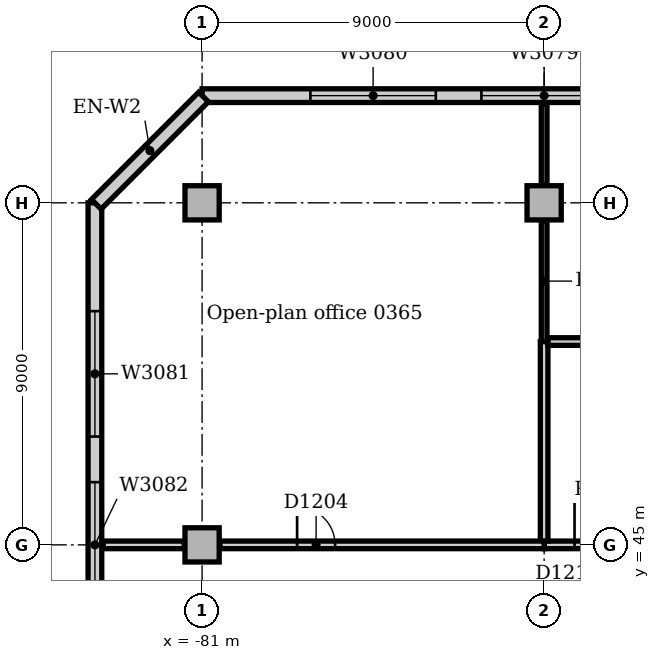
"""IFC4 building model, lengths in metres.
Left out: names, types, materials, properties, quantities, classifications, styles, units other than length and angle.
Written with IfcOpenShell. Run it as: python <this file> out.ifc"""

import sys

from ifc_helpers import new_model, si_unit, direction, frame, frame_2d, origin, origin_2d, place, context, subcontext, project, spatial, rectangle, extrude, element, fill, save


model = new_model("IFC4")
c1 = context("Model", 3, precision=1e-05, world=origin(), true_north=direction((0.0, 1.0)))
c2 = subcontext(c1, "Body", "Model", "MODEL_VIEW")
j1 = project(units=[si_unit("LENGTHUNIT", "METRE"), si_unit("PLANEANGLEUNIT", "RADIAN")], contexts=[c1])
p1 = place(None, origin())
s1 = spatial("IfcSite", under=j1, at=p1, CompositionType="ELEMENT")
p2 = place(p1, origin())
s2 = spatial("IfcBuilding", under=s1, at=p2, CompositionType="ELEMENT")
p3 = place(p2, frame((0.0, 0.0, 16.0)))
s3 = spatial("IfcBuildingStorey", under=s2, at=p3, CompositionType="ELEMENT", Elevation=16.0)
for number, where, z_axis, x_axis in (
    (1, (-81.0, 45.0, 0.0), (0.0, 0.0, 1.0), (1.0, 0.0, 0.0)),
    (2, (-81.0, 54.0, 0.0), (0.0, 0.0, 1.0), (1.0, 0.0, 0.0)),
    (3, (-72.0, 54.0, 0.0), (0.0, 0.0, 1.0), (1.0, 0.0, 0.0)),
):
    element("IfcColumn", number, at=place(p3, frame(where, z_axis=z_axis, x_axis=x_axis)), inside=s3, PredefinedType="COLUMN", context=c2, shape_type="SweptSolid", body=[
        extrude(rectangle(XDim=0.9, YDim=0.9, at=origin_2d()), origin(), (0.0, 0.0, 1.0), 4.7),
    ])
p4 = place(p3, frame((63.0, 56.82, 0.0), z_axis=(0.0, 0.0, 1.0), x_axis=(-1.0, 0.0, 0.0)))
e4 = element("IfcWall", 4, at=p4, inside=s3, PredefinedType="STANDARD", context=c2, shape_type="SweptSolid", body=[
    extrude(rectangle(XDim=144.0, YDim=0.36, at=frame_2d((72.0, 0.0))), origin(), (0.0, 0.0, 1.0), 4.7),
])
p5 = place(p4, frame((2.85, 0.0, 0.9)))
e5 = element("IfcOpeningElement", 5, at=p5, cuts=e4, PredefinedType="OPENING", context=c2, shape_type="SweptSolid", body=[
    extrude(rectangle(XDim=3.3, YDim=2.4, at=frame_2d((1.65, 1.2))), frame((0.0, 0.19, 0.0), z_axis=(0.0, -1.0, 0.0), x_axis=(1.0, 0.0, 0.0)), (0.0, 0.0, 1.0), 0.38),
])
p6 = place(p4, frame((7.35, 0.0, 0.9)))
e6 = element("IfcOpeningElement", 6, at=p6, cuts=e4, PredefinedType="OPENING", context=c2, shape_type="SweptSolid", body=[
    extrude(rectangle(XDim=3.3, YDim=2.4, at=frame_2d((1.65, 1.2))), frame((0.0, 0.19, 0.0), z_axis=(0.0, -1.0, 0.0), x_axis=(1.0, 0.0, 0.0)), (0.0, 0.0, 1.0), 0.38),
])
p7 = place(p4, frame((11.85, 0.0, 0.9)))
e7 = element("IfcOpeningElement", 7, at=p7, cuts=e4, PredefinedType="OPENING", context=c2, shape_type="SweptSolid", body=[
    extrude(rectangle(XDim=3.3, YDim=2.4, at=frame_2d((1.65, 1.2))), frame((0.0, 0.19, 0.0), z_axis=(0.0, -1.0, 0.0), x_axis=(1.0, 0.0, 0.0)), (0.0, 0.0, 1.0), 0.38),
])
p8 = place(p4, frame((16.35, 0.0, 0.9)))
e8 = element("IfcOpeningElement", 8, at=p8, cuts=e4, PredefinedType="OPENING", context=c2, shape_type="SweptSolid", body=[
    extrude(rectangle(XDim=3.3, YDim=2.4, at=frame_2d((1.65, 1.2))), frame((0.0, 0.19, 0.0), z_axis=(0.0, -1.0, 0.0), x_axis=(1.0, 0.0, 0.0)), (0.0, 0.0, 1.0), 0.38),
])
p9 = place(p4, frame((20.85, 0.0, 0.9)))
e9 = element("IfcOpeningElement", 9, at=p9, cuts=e4, PredefinedType="OPENING", context=c2, shape_type="SweptSolid", body=[
    extrude(rectangle(XDim=3.3, YDim=2.4, at=frame_2d((1.65, 1.2))), frame((0.0, 0.19, 0.0), z_axis=(0.0, -1.0, 0.0), x_axis=(1.0, 0.0, 0.0)), (0.0, 0.0, 1.0), 0.38),
])
p10 = place(p4, frame((25.35, 0.0, 0.9)))
e10 = element("IfcOpeningElement", 10, at=p10, cuts=e4, PredefinedType="OPENING", context=c2, shape_type="SweptSolid", body=[
    extrude(rectangle(XDim=3.3, YDim=2.4, at=frame_2d((1.65, 1.2))), frame((0.0, 0.19, 0.0), z_axis=(0.0, -1.0, 0.0), x_axis=(1.0, 0.0, 0.0)), (0.0, 0.0, 1.0), 0.38),
])
p11 = place(p4, frame((29.85, 0.0, 0.9)))
e11 = element("IfcOpeningElement", 11, at=p11, cuts=e4, PredefinedType="OPENING", context=c2, shape_type="SweptSolid", body=[
    extrude(rectangle(XDim=3.3, YDim=2.4, at=frame_2d((1.65, 1.2))), frame((0.0, 0.19, 0.0), z_axis=(0.0, -1.0, 0.0), x_axis=(1.0, 0.0, 0.0)), (0.0, 0.0, 1.0), 0.38),
])
p12 = place(p4, frame((34.35, 0.0, 0.9)))
e12 = element("IfcOpeningElement", 12, at=p12, cuts=e4, PredefinedType="OPENING", context=c2, shape_type="SweptSolid", body=[
    extrude(rectangle(XDim=3.3, YDim=2.4, at=frame_2d((1.65, 1.2))), frame((0.0, 0.19, 0.0), z_axis=(0.0, -1.0, 0.0), x_axis=(1.0, 0.0, 0.0)), (0.0, 0.0, 1.0), 0.38),
])
p13 = place(p4, frame((38.85, 0.0, 0.9)))
e13 = element("IfcOpeningElement", 13, at=p13, cuts=e4, PredefinedType="OPENING", context=c2, shape_type="SweptSolid", body=[
    extrude(rectangle(XDim=3.3, YDim=2.4, at=frame_2d((1.65, 1.2))), frame((0.0, 0.19, 0.0), z_axis=(0.0, -1.0, 0.0), x_axis=(1.0, 0.0, 0.0)), (0.0, 0.0, 1.0), 0.38),
])
p14 = place(p4, frame((43.35, 0.0, 0.9)))
e14 = element("IfcOpeningElement", 14, at=p14, cuts=e4, PredefinedType="OPENING", context=c2, shape_type="SweptSolid", body=[
    extrude(rectangle(XDim=3.3, YDim=2.4, at=frame_2d((1.65, 1.2))), frame((0.0, 0.19, 0.0), z_axis=(0.0, -1.0, 0.0), x_axis=(1.0, 0.0, 0.0)), (0.0, 0.0, 1.0), 0.38),
])
p15 = place(p4, frame((47.85, 0.0, 0.9)))
e15 = element("IfcOpeningElement", 15, at=p15, cuts=e4, PredefinedType="OPENING", context=c2, shape_type="SweptSolid", body=[
    extrude(rectangle(XDim=3.3, YDim=2.4, at=frame_2d((1.65, 1.2))), frame((0.0, 0.19, 0.0), z_axis=(0.0, -1.0, 0.0), x_axis=(1.0, 0.0, 0.0)), (0.0, 0.0, 1.0), 0.38),
])
p16 = place(p4, frame((52.35, 0.0, 0.9)))
e16 = element("IfcOpeningElement", 16, at=p16, cuts=e4, PredefinedType="OPENING", context=c2, shape_type="SweptSolid", body=[
    extrude(rectangle(XDim=3.3, YDim=2.4, at=frame_2d((1.65, 1.2))), frame((0.0, 0.19, 0.0), z_axis=(0.0, -1.0, 0.0), x_axis=(1.0, 0.0, 0.0)), (0.0, 0.0, 1.0), 0.38),
])
p17 = place(p4, frame((56.85, 0.0, 0.9)))
e17 = element("IfcOpeningElement", 17, at=p17, cuts=e4, PredefinedType="OPENING", context=c2, shape_type="SweptSolid", body=[
    extrude(rectangle(XDim=3.3, YDim=2.4, at=frame_2d((1.65, 1.2))), frame((0.0, 0.19, 0.0), z_axis=(0.0, -1.0, 0.0), x_axis=(1.0, 0.0, 0.0)), (0.0, 0.0, 1.0), 0.38),
])
p18 = place(p4, frame((92.85, 0.0, 0.9)))
e18 = element("IfcOpeningElement", 18, at=p18, cuts=e4, PredefinedType="OPENING", context=c2, shape_type="SweptSolid", body=[
    extrude(rectangle(XDim=3.3, YDim=2.4, at=frame_2d((1.65, 1.2))), frame((0.0, 0.19, 0.0), z_axis=(0.0, -1.0, 0.0), x_axis=(1.0, 0.0, 0.0)), (0.0, 0.0, 1.0), 0.38),
])
p19 = place(p4, frame((97.35, 0.0, 0.9)))
e19 = element("IfcOpeningElement", 19, at=p19, cuts=e4, PredefinedType="OPENING", context=c2, shape_type="SweptSolid", body=[
    extrude(rectangle(XDim=3.3, YDim=2.4, at=frame_2d((1.65, 1.2))), frame((0.0, 0.19, 0.0), z_axis=(0.0, -1.0, 0.0), x_axis=(1.0, 0.0, 0.0)), (0.0, 0.0, 1.0), 0.38),
])
p20 = place(p4, frame((101.85, 0.0, 0.9)))
e20 = element("IfcOpeningElement", 20, at=p20, cuts=e4, PredefinedType="OPENING", context=c2, shape_type="SweptSolid", body=[
    extrude(rectangle(XDim=3.3, YDim=2.4, at=frame_2d((1.65, 1.2))), frame((0.0, 0.19, 0.0), z_axis=(0.0, -1.0, 0.0), x_axis=(1.0, 0.0, 0.0)), (0.0, 0.0, 1.0), 0.38),
])
p21 = place(p4, frame((106.35, 0.0, 0.9)))
e21 = element("IfcOpeningElement", 21, at=p21, cuts=e4, PredefinedType="OPENING", context=c2, shape_type="SweptSolid", body=[
    extrude(rectangle(XDim=3.3, YDim=2.4, at=frame_2d((1.65, 1.2))), frame((0.0, 0.19, 0.0), z_axis=(0.0, -1.0, 0.0), x_axis=(1.0, 0.0, 0.0)), (0.0, 0.0, 1.0), 0.38),
])
p22 = place(p4, frame((110.85, 0.0, 0.9)))
e22 = element("IfcOpeningElement", 22, at=p22, cuts=e4, PredefinedType="OPENING", context=c2, shape_type="SweptSolid", body=[
    extrude(rectangle(XDim=3.3, YDim=2.4, at=frame_2d((1.65, 1.2))), frame((0.0, 0.19, 0.0), z_axis=(0.0, -1.0, 0.0), x_axis=(1.0, 0.0, 0.0)), (0.0, 0.0, 1.0), 0.38),
])
p23 = place(p4, frame((115.35, 0.0, 0.9)))
e23 = element("IfcOpeningElement", 23, at=p23, cuts=e4, PredefinedType="OPENING", context=c2, shape_type="SweptSolid", body=[
    extrude(rectangle(XDim=3.3, YDim=2.4, at=frame_2d((1.65, 1.2))), frame((0.0, 0.19, 0.0), z_axis=(0.0, -1.0, 0.0), x_axis=(1.0, 0.0, 0.0)), (0.0, 0.0, 1.0), 0.38),
])
p24 = place(p4, frame((119.85, 0.0, 0.9)))
e24 = element("IfcOpeningElement", 24, at=p24, cuts=e4, PredefinedType="OPENING", context=c2, shape_type="SweptSolid", body=[
    extrude(rectangle(XDim=3.3, YDim=2.4, at=frame_2d((1.65, 1.2))), frame((0.0, 0.19, 0.0), z_axis=(0.0, -1.0, 0.0), x_axis=(1.0, 0.0, 0.0)), (0.0, 0.0, 1.0), 0.38),
])
p25 = place(p4, frame((124.35, 0.0, 0.9)))
e25 = element("IfcOpeningElement", 25, at=p25, cuts=e4, PredefinedType="OPENING", context=c2, shape_type="SweptSolid", body=[
    extrude(rectangle(XDim=3.3, YDim=2.4, at=frame_2d((1.65, 1.2))), frame((0.0, 0.19, 0.0), z_axis=(0.0, -1.0, 0.0), x_axis=(1.0, 0.0, 0.0)), (0.0, 0.0, 1.0), 0.38),
])
p26 = place(p4, frame((128.85, 0.0, 0.9)))
e26 = element("IfcOpeningElement", 26, at=p26, cuts=e4, PredefinedType="OPENING", context=c2, shape_type="SweptSolid", body=[
    extrude(rectangle(XDim=3.3, YDim=2.4, at=frame_2d((1.65, 1.2))), frame((0.0, 0.19, 0.0), z_axis=(0.0, -1.0, 0.0), x_axis=(1.0, 0.0, 0.0)), (0.0, 0.0, 1.0), 0.38),
])
p27 = place(p4, frame((133.35, 0.0, 0.9)))
e27 = element("IfcOpeningElement", 27, at=p27, cuts=e4, PredefinedType="OPENING", context=c2, shape_type="SweptSolid", body=[
    extrude(rectangle(XDim=3.3, YDim=2.4, at=frame_2d((1.65, 1.2))), frame((0.0, 0.19, 0.0), z_axis=(0.0, -1.0, 0.0), x_axis=(1.0, 0.0, 0.0)), (0.0, 0.0, 1.0), 0.38),
])
p28 = place(p4, frame((137.85, 0.0, 0.9)))
e28 = element("IfcOpeningElement", 28, at=p28, cuts=e4, PredefinedType="OPENING", context=c2, shape_type="SweptSolid", body=[
    extrude(rectangle(XDim=3.3, YDim=2.4, at=frame_2d((1.65, 1.2))), frame((0.0, 0.19, 0.0), z_axis=(0.0, -1.0, 0.0), x_axis=(1.0, 0.0, 0.0)), (0.0, 0.0, 1.0), 0.38),
])
p29 = place(p3, frame((-83.82, 54.0, 0.0), z_axis=(0.0, 0.0, 1.0), x_axis=(0.0, -1.0, 0.0)))
e29 = element("IfcWall", 29, at=p29, inside=s3, PredefinedType="STANDARD", context=c2, shape_type="SweptSolid", body=[
    extrude(rectangle(XDim=63.0, YDim=0.36, at=frame_2d((31.5, 0.0))), origin(), (0.0, 0.0, 1.0), 4.7),
])
p30 = place(p29, frame((2.85, 0.0, 0.9)))
e30 = element("IfcOpeningElement", 30, at=p30, cuts=e29, PredefinedType="OPENING", context=c2, shape_type="SweptSolid", body=[
    extrude(rectangle(XDim=3.3, YDim=2.4, at=frame_2d((1.65, 1.2))), frame((0.0, 0.19, 0.0), z_axis=(0.0, -1.0, 0.0), x_axis=(1.0, 0.0, 0.0)), (0.0, 0.0, 1.0), 0.38),
])
p31 = place(p29, frame((7.35, 0.0, 0.9)))
e31 = element("IfcOpeningElement", 31, at=p31, cuts=e29, PredefinedType="OPENING", context=c2, shape_type="SweptSolid", body=[
    extrude(rectangle(XDim=3.3, YDim=2.4, at=frame_2d((1.65, 1.2))), frame((0.0, 0.19, 0.0), z_axis=(0.0, -1.0, 0.0), x_axis=(1.0, 0.0, 0.0)), (0.0, 0.0, 1.0), 0.38),
])
p32 = place(p29, frame((11.85, 0.0, 0.9)))
e32 = element("IfcOpeningElement", 32, at=p32, cuts=e29, PredefinedType="OPENING", context=c2, shape_type="SweptSolid", body=[
    extrude(rectangle(XDim=3.3, YDim=2.4, at=frame_2d((1.65, 1.2))), frame((0.0, 0.19, 0.0), z_axis=(0.0, -1.0, 0.0), x_axis=(1.0, 0.0, 0.0)), (0.0, 0.0, 1.0), 0.38),
])
p33 = place(p29, frame((16.35, 0.0, 0.9)))
e33 = element("IfcOpeningElement", 33, at=p33, cuts=e29, PredefinedType="OPENING", context=c2, shape_type="SweptSolid", body=[
    extrude(rectangle(XDim=3.3, YDim=2.4, at=frame_2d((1.65, 1.2))), frame((0.0, 0.19, 0.0), z_axis=(0.0, -1.0, 0.0), x_axis=(1.0, 0.0, 0.0)), (0.0, 0.0, 1.0), 0.38),
])
p34 = place(p29, frame((20.85, 0.0, 0.9)))
e34 = element("IfcOpeningElement", 34, at=p34, cuts=e29, PredefinedType="OPENING", context=c2, shape_type="SweptSolid", body=[
    extrude(rectangle(XDim=3.3, YDim=2.4, at=frame_2d((1.65, 1.2))), frame((0.0, 0.19, 0.0), z_axis=(0.0, -1.0, 0.0), x_axis=(1.0, 0.0, 0.0)), (0.0, 0.0, 1.0), 0.38),
])
p35 = place(p29, frame((25.35, 0.0, 0.9)))
e35 = element("IfcOpeningElement", 35, at=p35, cuts=e29, PredefinedType="OPENING", context=c2, shape_type="SweptSolid", body=[
    extrude(rectangle(XDim=3.3, YDim=2.4, at=frame_2d((1.65, 1.2))), frame((0.0, 0.19, 0.0), z_axis=(0.0, -1.0, 0.0), x_axis=(1.0, 0.0, 0.0)), (0.0, 0.0, 1.0), 0.38),
])
p36 = place(p29, frame((29.85, 0.0, 0.9)))
e36 = element("IfcOpeningElement", 36, at=p36, cuts=e29, PredefinedType="OPENING", context=c2, shape_type="SweptSolid", body=[
    extrude(rectangle(XDim=3.3, YDim=2.4, at=frame_2d((1.65, 1.2))), frame((0.0, 0.19, 0.0), z_axis=(0.0, -1.0, 0.0), x_axis=(1.0, 0.0, 0.0)), (0.0, 0.0, 1.0), 0.38),
])
p37 = place(p29, frame((34.35, 0.0, 0.9)))
e37 = element("IfcOpeningElement", 37, at=p37, cuts=e29, PredefinedType="OPENING", context=c2, shape_type="SweptSolid", body=[
    extrude(rectangle(XDim=3.3, YDim=2.4, at=frame_2d((1.65, 1.2))), frame((0.0, 0.19, 0.0), z_axis=(0.0, -1.0, 0.0), x_axis=(1.0, 0.0, 0.0)), (0.0, 0.0, 1.0), 0.38),
])
p38 = place(p29, frame((38.85, 0.0, 0.9)))
e38 = element("IfcOpeningElement", 38, at=p38, cuts=e29, PredefinedType="OPENING", context=c2, shape_type="SweptSolid", body=[
    extrude(rectangle(XDim=3.3, YDim=2.4, at=frame_2d((1.65, 1.2))), frame((0.0, 0.19, 0.0), z_axis=(0.0, -1.0, 0.0), x_axis=(1.0, 0.0, 0.0)), (0.0, 0.0, 1.0), 0.38),
])
p39 = place(p29, frame((43.35, 0.0, 0.9)))
e39 = element("IfcOpeningElement", 39, at=p39, cuts=e29, PredefinedType="OPENING", context=c2, shape_type="SweptSolid", body=[
    extrude(rectangle(XDim=3.3, YDim=2.4, at=frame_2d((1.65, 1.2))), frame((0.0, 0.19, 0.0), z_axis=(0.0, -1.0, 0.0), x_axis=(1.0, 0.0, 0.0)), (0.0, 0.0, 1.0), 0.38),
])
p40 = place(p29, frame((47.85, 0.0, 0.9)))
e40 = element("IfcOpeningElement", 40, at=p40, cuts=e29, PredefinedType="OPENING", context=c2, shape_type="SweptSolid", body=[
    extrude(rectangle(XDim=3.3, YDim=2.4, at=frame_2d((1.65, 1.2))), frame((0.0, 0.19, 0.0), z_axis=(0.0, -1.0, 0.0), x_axis=(1.0, 0.0, 0.0)), (0.0, 0.0, 1.0), 0.38),
])
p41 = place(p29, frame((52.35, 0.0, 0.9)))
e41 = element("IfcOpeningElement", 41, at=p41, cuts=e29, PredefinedType="OPENING", context=c2, shape_type="SweptSolid", body=[
    extrude(rectangle(XDim=3.3, YDim=2.4, at=frame_2d((1.65, 1.2))), frame((0.0, 0.19, 0.0), z_axis=(0.0, -1.0, 0.0), x_axis=(1.0, 0.0, 0.0)), (0.0, 0.0, 1.0), 0.38),
])
p42 = place(p29, frame((56.85, 0.0, 0.9)))
e42 = element("IfcOpeningElement", 42, at=p42, cuts=e29, PredefinedType="OPENING", context=c2, shape_type="SweptSolid", body=[
    extrude(rectangle(XDim=3.3, YDim=2.4, at=frame_2d((1.65, 1.2))), frame((0.0, 0.19, 0.0), z_axis=(0.0, -1.0, 0.0), x_axis=(1.0, 0.0, 0.0)), (0.0, 0.0, 1.0), 0.38),
])
p43 = place(p3, frame((-80.961, 56.784, 0.0), z_axis=(0.0, 0.0, 1.0), x_axis=(-0.707106781187, -0.707106781187, 0.0)))
e43 = element("IfcWall", 43, at=p43, inside=s3, PredefinedType="STANDARD", context=c2, shape_type="SweptSolid", body=[
    extrude(rectangle(XDim=3.993, YDim=0.36, at=frame_2d((1.996, 0.0))), origin(), (0.0, 0.0, 1.0), 4.7),
])
p44 = place(p3, frame((-72.0, 45.0, 0.0), z_axis=(0.0, 0.0, 1.0), x_axis=(1.0, 0.0, 0.0)))
e44 = element("IfcWall", 44, at=p44, inside=s3, PredefinedType="SOLIDWALL", context=c2, shape_type="SweptSolid", body=[
    extrude(rectangle(XDim=9.0, YDim=0.2, at=frame_2d((4.5, 0.0))), origin(), (0.0, 0.0, 1.0), 4.7),
])
p45 = place(p44, frame((0.8, 0.0, 0.0)))
e45 = element("IfcOpeningElement", 45, at=p45, cuts=e44, PredefinedType="OPENING", context=c2, shape_type="SweptSolid", body=[
    extrude(rectangle(XDim=1.2, YDim=2.1, at=frame_2d((0.6, 1.05))), frame((0.0, 0.11, 0.0), z_axis=(0.0, -1.0, 0.0), x_axis=(1.0, 0.0, 0.0)), (0.0, 0.0, 1.0), 0.22),
])
p46 = place(p3, frame((-72.0, 45.1, 0.0), z_axis=(0.0, 0.0, 1.0), x_axis=(0.0, 1.0, 0.0)))
e46 = element("IfcWall", 46, at=p46, inside=s3, PredefinedType="SOLIDWALL", context=c2, shape_type="SweptSolid", body=[
    extrude(rectangle(XDim=5.25, YDim=0.2, at=frame_2d((2.625, 0.0))), origin(), (0.0, 0.0, 1.0), 4.7),
])
p47 = place(p3, frame((-71.9, 50.35, 0.0), z_axis=(0.0, 0.0, 1.0), x_axis=(1.0, 0.0, 0.0)))
e47 = element("IfcWall", 47, at=p47, inside=s3, PredefinedType="SOLIDWALL", context=c2, shape_type="SweptSolid", body=[
    extrude(rectangle(XDim=9.0, YDim=0.2, at=frame_2d((4.5, 0.0))), origin(), (0.0, 0.0, 1.0), 4.7),
])
p48 = place(p3, frame((-83.6, 45.0, 0.0), z_axis=(0.0, 0.0, 1.0), x_axis=(1.0, 0.0, 0.0)))
e48 = element("IfcWall", 48, at=p48, inside=s3, PredefinedType="PARTITIONING", context=c2, shape_type="SweptSolid", body=[
    extrude(rectangle(XDim=2.13, YDim=0.2, at=frame_2d((1.065, 0.0))), origin(), (0.0, 0.0, 1.0), 4.7),
])
p49 = place(p3, frame((-80.53, 45.0, 0.0), z_axis=(0.0, 0.0, 1.0), x_axis=(1.0, 0.0, 0.0)))
e49 = element("IfcWall", 49, at=p49, inside=s3, PredefinedType="PARTITIONING", context=c2, shape_type="SweptSolid", body=[
    extrude(rectangle(XDim=8.53, YDim=0.2, at=frame_2d((4.265, 0.0))), origin(), (0.0, 0.0, 1.0), 4.7),
])
p50 = place(p49, frame((2.03, 0.0, 0.0)))
e50 = element("IfcOpeningElement", 50, at=p50, cuts=e49, PredefinedType="OPENING", context=c2, shape_type="SweptSolid", body=[
    extrude(rectangle(XDim=1.0, YDim=2.1, at=frame_2d((0.5, 1.05))), frame((0.0, 0.11, 0.0), z_axis=(0.0, -1.0, 0.0), x_axis=(1.0, 0.0, 0.0)), (0.0, 0.0, 1.0), 0.22),
])
p51 = place(p3, frame((-72.0, 50.35, 0.0), z_axis=(0.0, 0.0, 1.0), x_axis=(0.0, 1.0, 0.0)))
e51 = element("IfcWall", 51, at=p51, inside=s3, PredefinedType="PARTITIONING", context=c2, shape_type="SweptSolid", body=[
    extrude(rectangle(XDim=3.18, YDim=0.15, at=frame_2d((1.59, 0.0))), origin(), (0.0, 0.0, 1.0), 4.7),
])
p52 = place(p3, frame((-72.0, 54.47, 0.0), z_axis=(0.0, 0.0, 1.0), x_axis=(0.0, 1.0, 0.0)))
e52 = element("IfcWall", 52, at=p52, inside=s3, PredefinedType="PARTITIONING", context=c2, shape_type="SweptSolid", body=[
    extrude(rectangle(XDim=2.13, YDim=0.15, at=frame_2d((1.065, 0.0))), origin(), (0.0, 0.0, 1.0), 4.7),
])
p53 = place(p27, origin())
e53 = element("IfcWindow", 53, at=p53, inside=s3, PartitioningType="SINGLE_PANEL", PredefinedType="WINDOW", context=c2, shape_type="SweptSolid", body=[
    extrude(rectangle(XDim=3.3, YDim=2.4, at=frame_2d((1.65, 1.2))), frame((0.0, 0.13, 0.0), z_axis=(0.0, -1.0, 0.0), x_axis=(1.0, 0.0, 0.0)), (0.0, 0.0, 1.0), 0.06),
])
fill(e27, e53)
p54 = place(p28, origin())
e54 = element("IfcWindow", 54, at=p54, inside=s3, PartitioningType="SINGLE_PANEL", PredefinedType="WINDOW", context=c2, shape_type="SweptSolid", body=[
    extrude(rectangle(XDim=3.3, YDim=2.4, at=frame_2d((1.65, 1.2))), frame((0.0, 0.13, 0.0), z_axis=(0.0, -1.0, 0.0), x_axis=(1.0, 0.0, 0.0)), (0.0, 0.0, 1.0), 0.06),
])
fill(e28, e54)
p55 = place(p30, origin())
e55 = element("IfcWindow", 55, at=p55, inside=s3, PartitioningType="SINGLE_PANEL", PredefinedType="WINDOW", context=c2, shape_type="SweptSolid", body=[
    extrude(rectangle(XDim=3.3, YDim=2.4, at=frame_2d((1.65, 1.2))), frame((0.0, 0.13, 0.0), z_axis=(0.0, -1.0, 0.0), x_axis=(1.0, 0.0, 0.0)), (0.0, 0.0, 1.0), 0.06),
])
fill(e30, e55)
p56 = place(p31, origin())
e56 = element("IfcWindow", 56, at=p56, inside=s3, PartitioningType="SINGLE_PANEL", PredefinedType="WINDOW", context=c2, shape_type="SweptSolid", body=[
    extrude(rectangle(XDim=3.3, YDim=2.4, at=frame_2d((1.65, 1.2))), frame((0.0, 0.13, 0.0), z_axis=(0.0, -1.0, 0.0), x_axis=(1.0, 0.0, 0.0)), (0.0, 0.0, 1.0), 0.06),
])
fill(e31, e56)
p57 = place(p50, origin())
e57 = element("IfcDoor", 57, at=p57, inside=s3, OperationType="SINGLE_SWING_LEFT", PredefinedType="DOOR", context=c2, shape_type="SweptSolid", body=[
    extrude(rectangle(XDim=1.0, YDim=2.1, at=frame_2d((0.5, 1.05))), frame((0.0, 0.025, 0.0), z_axis=(0.0, -1.0, 0.0), x_axis=(1.0, 0.0, 0.0)), (0.0, 0.0, 1.0), 0.05),
])
fill(e50, e57)
p58 = place(p45, origin())
e58 = element("IfcDoor", 58, at=p58, inside=s3, OperationType="SINGLE_SWING_LEFT", PredefinedType="DOOR", context=c2, shape_type="SweptSolid", body=[
    extrude(rectangle(XDim=1.2, YDim=2.1, at=frame_2d((0.6, 1.05))), frame((0.0, 0.025, 0.0), z_axis=(0.0, -1.0, 0.0), x_axis=(1.0, 0.0, 0.0)), (0.0, 0.0, 1.0), 0.05),
])
fill(e45, e58)
save(model, sys.argv[1])
